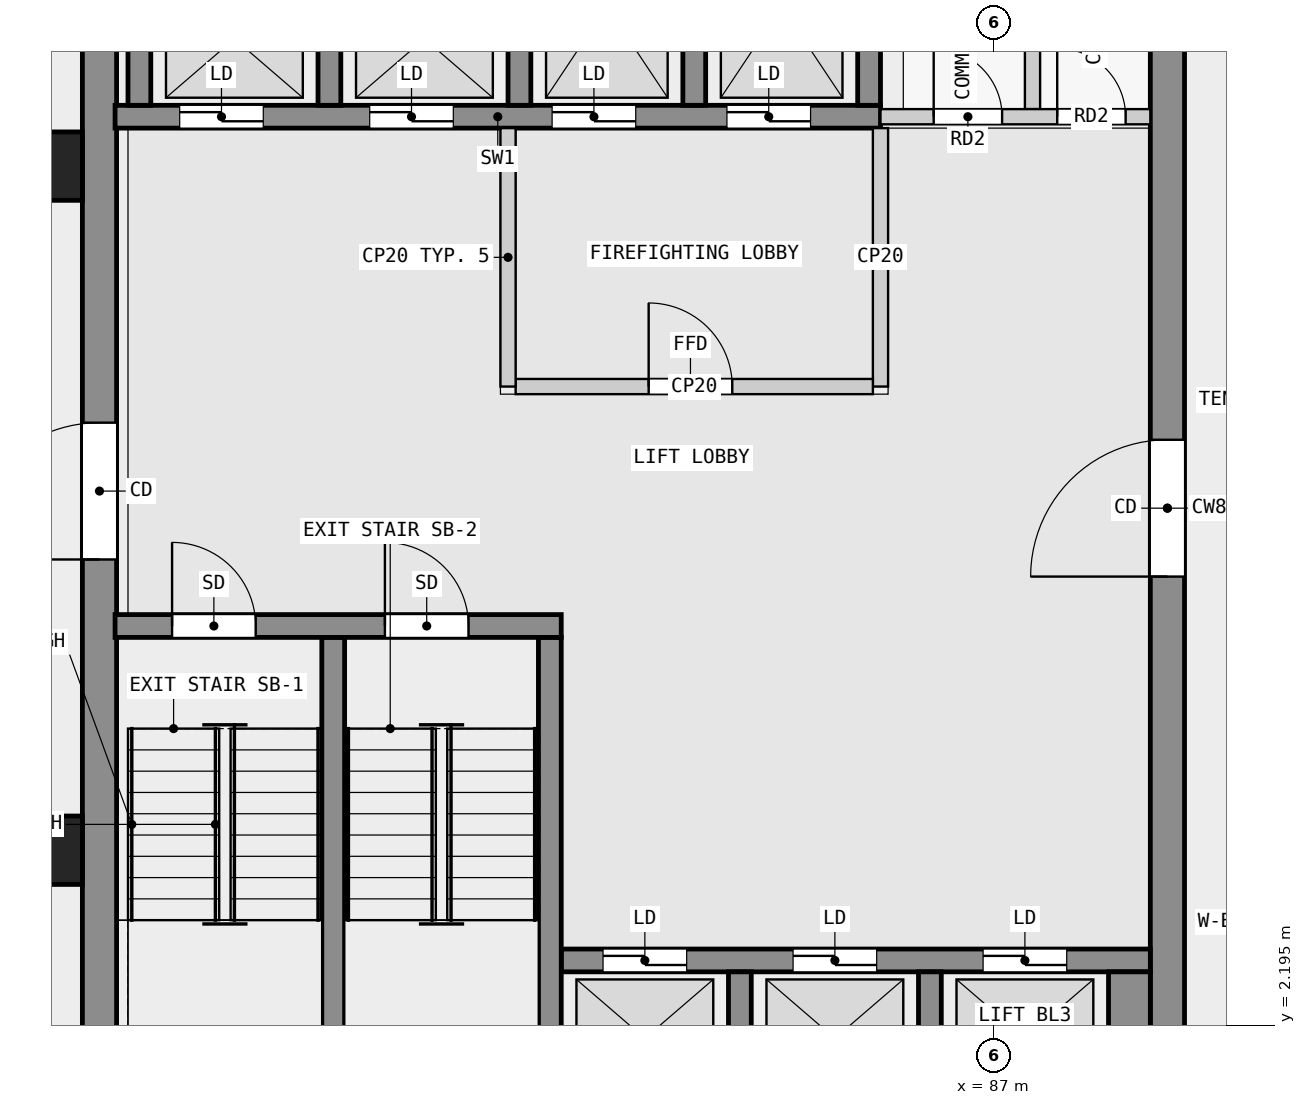
"""IFC4 building model, lengths in metres.
Left out: names, types, materials, properties, quantities, classifications, styles, units other than length and angle.
Written with IfcOpenShell. Run it as: python <this file> out.ifc"""

import sys

from ifc_helpers import new_model, si_unit, direction, frame, frame_2d, origin, origin_2d, place, context, subcontext, project, spatial, rectangle, extrude, element, fill, save


model = new_model("IFC4")
c1 = context("Model", 3, precision=1e-05, world=origin(), true_north=direction((0.0, 1.0)))
c2 = subcontext(c1, "Body", "Model", "MODEL_VIEW")
j1 = project(units=[si_unit("LENGTHUNIT", "METRE"), si_unit("PLANEANGLEUNIT", "RADIAN")], contexts=[c1])
p1 = place(None, origin())
s1 = spatial("IfcSite", under=j1, at=p1, CompositionType="ELEMENT")
p2 = place(p1, origin())
s2 = spatial("IfcBuilding", under=s1, at=p2, CompositionType="ELEMENT")
p3 = place(p2, frame((0.0, 0.0, 65.3)))
s3 = spatial("IfcBuildingStorey", under=s2, at=p3, CompositionType="ELEMENT", Elevation=65.3)
for number, where, z_axis, x_axis in (
    (1, (74.55, 13.5, 0.0), (0.0, 0.0, 1.0), (1.0, 0.0, 0.0)),
    (2, (74.55, 4.5, 0.0), (0.0, 0.0, 1.0), (1.0, 0.0, 0.0)),
):
    element("IfcColumn", number, at=place(p3, frame(where, z_axis=z_axis, x_axis=x_axis)), inside=s3, PredefinedType="COLUMN", context=c2, shape_type="SweptSolid", body=[
        extrude(rectangle(XDim=0.9, YDim=0.9, at=origin_2d()), origin(), (0.0, 0.0, 1.0), 3.5),
    ])
p4 = place(p3, frame((75.225, 0.45, 0.0), z_axis=(0.0, 0.0, 1.0), x_axis=(0.0, 1.0, 0.0)))
e3 = element("IfcWall", 3, at=p4, inside=s3, PredefinedType="SHEAR", context=c2, shape_type="SweptSolid", body=[
    extrude(rectangle(XDim=17.1, YDim=0.45, at=frame_2d((8.55, 0.0))), origin(), (0.0, 0.0, 1.0), 3.25),
])
p5 = place(p4, frame((7.875, 0.0, 0.0)))
e4 = element("IfcOpeningElement", 4, at=p5, cuts=e3, PredefinedType="OPENING", context=c2, shape_type="SweptSolid", body=[
    extrude(rectangle(XDim=1.8, YDim=2.1, at=frame_2d((0.9, 1.05))), frame((0.0, 0.235, 0.0), z_axis=(0.0, -1.0, 0.0), x_axis=(1.0, 0.0, 0.0)), (0.0, 0.0, 1.0), 0.47),
])
p6 = place(p3, frame((89.275, 0.45, 0.0), z_axis=(0.0, 0.0, 1.0), x_axis=(0.0, 1.0, 0.0)))
e5 = element("IfcWall", 5, at=p6, inside=s3, PredefinedType="SHEAR", context=c2, shape_type="SweptSolid", body=[
    extrude(rectangle(XDim=17.1, YDim=0.45, at=frame_2d((8.55, 0.0))), origin(), (0.0, 0.0, 1.0), 3.25),
])
p7 = place(p6, frame((7.65, 0.0, 0.0)))
e6 = element("IfcOpeningElement", 6, at=p7, cuts=e5, PredefinedType="OPENING", context=c2, shape_type="SweptSolid", body=[
    extrude(rectangle(XDim=1.8, YDim=2.1, at=frame_2d((0.9, 1.05))), frame((0.0, 0.235, 0.0), z_axis=(0.0, -1.0, 0.0), x_axis=(1.0, 0.0, 0.0)), (0.0, 0.0, 1.0), 0.47),
])
p8 = place(p3, frame((75.43, 7.45, 0.0), z_axis=(0.0, 0.0, 1.0), x_axis=(1.0, 0.0, 0.0)))
e7 = element("IfcWall", 7, at=p8, inside=s3, PredefinedType="SHEAR", context=c2, shape_type="SweptSolid", body=[
    extrude(rectangle(XDim=5.87, YDim=0.3, at=frame_2d((2.935, 0.0))), origin(), (0.0, 0.0, 1.0), 3.25),
])
p9 = place(p8, frame((0.75, 0.0, 0.0)))
e8 = element("IfcOpeningElement", 8, at=p9, cuts=e7, PredefinedType="OPENING", context=c2, shape_type="SweptSolid", body=[
    extrude(rectangle(XDim=1.1, YDim=2.1, at=frame_2d((0.55, 1.05))), frame((0.0, 0.16, 0.0), z_axis=(0.0, -1.0, 0.0), x_axis=(1.0, 0.0, 0.0)), (0.0, 0.0, 1.0), 0.32),
])
p10 = place(p8, frame((3.55, 0.0, 0.0)))
e9 = element("IfcOpeningElement", 9, at=p10, cuts=e7, PredefinedType="OPENING", context=c2, shape_type="SweptSolid", body=[
    extrude(rectangle(XDim=1.1, YDim=2.1, at=frame_2d((0.55, 1.05))), frame((0.0, 0.16, 0.0), z_axis=(0.0, -1.0, 0.0), x_axis=(1.0, 0.0, 0.0)), (0.0, 0.0, 1.0), 0.32),
])
for number, where, z_axis, x_axis in (
    (10, (78.3, 0.9, 0.0), (0.0, 0.0, 1.0), (0.0, 1.0, 0.0)),
    (11, (81.15, 0.9, 0.0), (0.0, 0.0, 1.0), (0.0, 1.0, 0.0)),
):
    element("IfcWall", number, at=place(p3, frame(where, z_axis=z_axis, x_axis=x_axis)), inside=s3, PredefinedType="SHEAR", context=c2, shape_type="SweptSolid", body=[
        extrude(rectangle(XDim=6.4, YDim=0.3, at=frame_2d((3.2, 0.0))), origin(), (0.0, 0.0, 1.0), 3.25),
    ])
for number, where, z_axis, x_axis in (
    (12, (83.65, 0.9, 0.0), (0.0, 0.0, 1.0), (0.0, 1.0, 0.0)),
    (13, (86.15, 0.9, 0.0), (0.0, 0.0, 1.0), (0.0, 1.0, 0.0)),
):
    element("IfcWall", number, at=place(p3, frame(where, z_axis=z_axis, x_axis=x_axis)), inside=s3, PredefinedType="SHEAR", context=c2, shape_type="SweptSolid", body=[
        extrude(rectangle(XDim=2.0, YDim=0.3, at=frame_2d((1.0, 0.0))), origin(), (0.0, 0.0, 1.0), 3.25),
    ])
p11 = place(p3, frame((88.775, 0.9, 0.0), z_axis=(0.0, 0.0, 1.0), x_axis=(0.0, 1.0, 0.0)))
e14 = element("IfcWall", 14, at=p11, inside=s3, PredefinedType="SHEAR", context=c2, shape_type="SweptSolid", body=[
    extrude(rectangle(XDim=2.0, YDim=0.55, at=frame_2d((1.0, 0.0))), origin(), (0.0, 0.0, 1.0), 3.25),
])
p12 = place(p3, frame((81.3, 3.05, 0.0), z_axis=(0.0, 0.0, 1.0), x_axis=(1.0, 0.0, 0.0)))
e15 = element("IfcWall", 15, at=p12, inside=s3, PredefinedType="SHEAR", context=c2, shape_type="SweptSolid", body=[
    extrude(rectangle(XDim=7.75, YDim=0.3, at=frame_2d((3.875, 0.0))), origin(), (0.0, 0.0, 1.0), 3.25),
])
p13 = place(p12, frame((0.55, 0.0, 0.0)))
e16 = element("IfcOpeningElement", 16, at=p13, cuts=e15, PredefinedType="OPENING", context=c2, shape_type="SweptSolid", body=[
    extrude(rectangle(XDim=1.1, YDim=2.1, at=frame_2d((0.55, 1.05))), frame((0.0, 0.16, 0.0), z_axis=(0.0, -1.0, 0.0), x_axis=(1.0, 0.0, 0.0)), (0.0, 0.0, 1.0), 0.32),
])
p14 = place(p12, frame((3.05, 0.0, 0.0)))
e17 = element("IfcOpeningElement", 17, at=p14, cuts=e15, PredefinedType="OPENING", context=c2, shape_type="SweptSolid", body=[
    extrude(rectangle(XDim=1.1, YDim=2.1, at=frame_2d((0.55, 1.05))), frame((0.0, 0.16, 0.0), z_axis=(0.0, -1.0, 0.0), x_axis=(1.0, 0.0, 0.0)), (0.0, 0.0, 1.0), 0.32),
])
p15 = place(p12, frame((5.55, 0.0, 0.0)))
e18 = element("IfcOpeningElement", 18, at=p15, cuts=e15, PredefinedType="OPENING", context=c2, shape_type="SweptSolid", body=[
    extrude(rectangle(XDim=1.1, YDim=2.1, at=frame_2d((0.55, 1.05))), frame((0.0, 0.16, 0.0), z_axis=(0.0, -1.0, 0.0), x_axis=(1.0, 0.0, 0.0)), (0.0, 0.0, 1.0), 0.32),
])
p16 = place(p3, frame((75.43, 14.15, 0.0), z_axis=(0.0, 0.0, 1.0), x_axis=(1.0, 0.0, 0.0)))
e19 = element("IfcWall", 19, at=p16, inside=s3, PredefinedType="SHEAR", context=c2, shape_type="SweptSolid", body=[
    extrude(rectangle(XDim=10.07, YDim=0.3, at=frame_2d((5.035, 0.0))), origin(), (0.0, 0.0, 1.0), 3.25),
])
p17 = place(p16, frame((0.85, 0.0, 0.0)))
e20 = element("IfcOpeningElement", 20, at=p17, cuts=e19, PredefinedType="OPENING", context=c2, shape_type="SweptSolid", body=[
    extrude(rectangle(XDim=1.1, YDim=2.1, at=frame_2d((0.55, 1.05))), frame((0.0, 0.16, 0.0), z_axis=(0.0, -1.0, 0.0), x_axis=(1.0, 0.0, 0.0)), (0.0, 0.0, 1.0), 0.32),
])
p18 = place(p16, frame((3.35, 0.0, 0.0)))
e21 = element("IfcOpeningElement", 21, at=p18, cuts=e19, PredefinedType="OPENING", context=c2, shape_type="SweptSolid", body=[
    extrude(rectangle(XDim=1.1, YDim=2.1, at=frame_2d((0.55, 1.05))), frame((0.0, 0.16, 0.0), z_axis=(0.0, -1.0, 0.0), x_axis=(1.0, 0.0, 0.0)), (0.0, 0.0, 1.0), 0.32),
])
p19 = place(p16, frame((5.75, 0.0, 0.0)))
e22 = element("IfcOpeningElement", 22, at=p19, cuts=e19, PredefinedType="OPENING", context=c2, shape_type="SweptSolid", body=[
    extrude(rectangle(XDim=1.1, YDim=2.1, at=frame_2d((0.55, 1.05))), frame((0.0, 0.16, 0.0), z_axis=(0.0, -1.0, 0.0), x_axis=(1.0, 0.0, 0.0)), (0.0, 0.0, 1.0), 0.32),
])
p20 = place(p16, frame((8.05, 0.0, 0.0)))
e23 = element("IfcOpeningElement", 23, at=p20, cuts=e19, PredefinedType="OPENING", context=c2, shape_type="SweptSolid", body=[
    extrude(rectangle(XDim=1.1, YDim=2.1, at=frame_2d((0.55, 1.05))), frame((0.0, 0.16, 0.0), z_axis=(0.0, -1.0, 0.0), x_axis=(1.0, 0.0, 0.0)), (0.0, 0.0, 1.0), 0.32),
])
for number, where, z_axis, x_axis in (
    (24, (75.75, 14.3, 0.0), (0.0, 0.0, 1.0), (0.0, 1.0, 0.0)),
    (25, (78.25, 14.3, 0.0), (0.0, 0.0, 1.0), (0.0, 1.0, 0.0)),
    (26, (80.75, 14.3, 0.0), (0.0, 0.0, 1.0), (0.0, 1.0, 0.0)),
    (27, (83.05, 14.3, 0.0), (0.0, 0.0, 1.0), (0.0, 1.0, 0.0)),
    (28, (85.35, 14.3, 0.0), (0.0, 0.0, 1.0), (0.0, 1.0, 0.0)),
):
    element("IfcWall", number, at=place(p3, frame(where, z_axis=z_axis, x_axis=x_axis)), inside=s3, PredefinedType="SHEAR", context=c2, shape_type="SweptSolid", body=[
        extrude(rectangle(XDim=2.8, YDim=0.3, at=frame_2d((1.4, 0.0))), origin(), (0.0, 0.0, 1.0), 3.25),
    ])
p21 = place(p3, frame((80.6, 10.6, 0.0), z_axis=(0.0, 0.0, 1.0), x_axis=(0.0, 1.0, 0.0)))
e29 = element("IfcWall", 29, at=p21, inside=s3, PredefinedType="PARTITIONING", context=c2, shape_type="SweptSolid", body=[
    extrude(rectangle(XDim=3.4, YDim=0.2, at=frame_2d((1.7, 0.0))), origin(), (0.0, 0.0, 1.0), 3.25),
])
p22 = place(p3, frame((80.7, 10.6, 0.0), z_axis=(0.0, 0.0, 1.0), x_axis=(1.0, 0.0, 0.0)))
e30 = element("IfcWall", 30, at=p22, inside=s3, PredefinedType="PARTITIONING", context=c2, shape_type="SweptSolid", body=[
    extrude(rectangle(XDim=4.7, YDim=0.2, at=frame_2d((2.35, 0.0))), origin(), (0.0, 0.0, 1.0), 3.25),
])
p23 = place(p22, frame((1.75, 0.0, 0.0)))
e31 = element("IfcOpeningElement", 31, at=p23, cuts=e30, PredefinedType="OPENING", context=c2, shape_type="SweptSolid", body=[
    extrude(rectangle(XDim=1.1, YDim=2.1, at=frame_2d((0.55, 1.05))), frame((0.0, 0.11, 0.0), z_axis=(0.0, -1.0, 0.0), x_axis=(1.0, 0.0, 0.0)), (0.0, 0.0, 1.0), 0.22),
])
p24 = place(p3, frame((85.5, 10.6, 0.0), z_axis=(0.0, 0.0, 1.0), x_axis=(0.0, 1.0, 0.0)))
e32 = element("IfcWall", 32, at=p24, inside=s3, PredefinedType="PARTITIONING", context=c2, shape_type="SweptSolid", body=[
    extrude(rectangle(XDim=3.4, YDim=0.2, at=frame_2d((1.7, 0.0))), origin(), (0.0, 0.0, 1.0), 3.25),
])
p25 = place(p3, frame((85.5, 14.15, 0.0), z_axis=(0.0, 0.0, 1.0), x_axis=(1.0, 0.0, 0.0)))
e33 = element("IfcWall", 33, at=p25, inside=s3, PredefinedType="PARTITIONING", context=c2, shape_type="SweptSolid", body=[
    extrude(rectangle(XDim=3.55, YDim=0.2, at=frame_2d((1.775, 0.0))), origin(), (0.0, 0.0, 1.0), 3.25),
])
p26 = place(p25, frame((0.7, 0.0, 0.0)))
e34 = element("IfcOpeningElement", 34, at=p26, cuts=e33, PredefinedType="OPENING", context=c2, shape_type="SweptSolid", body=[
    extrude(rectangle(XDim=0.9, YDim=2.1, at=frame_2d((0.45, 1.05))), frame((0.0, 0.11, 0.0), z_axis=(0.0, -1.0, 0.0), x_axis=(1.0, 0.0, 0.0)), (0.0, 0.0, 1.0), 0.22),
])
p27 = place(p25, frame((2.325, 0.0, 0.0)))
e35 = element("IfcOpeningElement", 35, at=p27, cuts=e33, PredefinedType="OPENING", context=c2, shape_type="SweptSolid", body=[
    extrude(rectangle(XDim=0.9, YDim=2.1, at=frame_2d((0.45, 1.05))), frame((0.0, 0.11, 0.0), z_axis=(0.0, -1.0, 0.0), x_axis=(1.0, 0.0, 0.0)), (0.0, 0.0, 1.0), 0.22),
])
p28 = place(p3, frame((87.5, 14.25, 0.0), z_axis=(0.0, 0.0, 1.0), x_axis=(0.0, 1.0, 0.0)))
e36 = element("IfcWall", 36, at=p28, inside=s3, PredefinedType="PARTITIONING", context=c2, shape_type="SweptSolid", body=[
    extrude(rectangle(XDim=3.3, YDim=0.2, at=frame_2d((1.65, 0.0))), origin(), (0.0, 0.0, 1.0), 3.25),
])
p29 = place(p23, origin())
e37 = element("IfcDoor", 37, at=p29, inside=s3, OperationType="SINGLE_SWING_LEFT", PredefinedType="DOOR", context=c2, shape_type="SweptSolid", body=[
    extrude(rectangle(XDim=1.1, YDim=2.1, at=frame_2d((0.55, 1.05))), frame((0.0, 0.025, 0.0), z_axis=(0.0, -1.0, 0.0), x_axis=(1.0, 0.0, 0.0)), (0.0, 0.0, 1.0), 0.05),
])
fill(e31, e37)
p30 = place(p13, origin())
e38 = element("IfcDoor", 38, at=p30, inside=s3, OperationType="DOUBLE_DOOR_SLIDING", PredefinedType="DOOR", context=c2, shape_type="SweptSolid", body=[
    extrude(rectangle(XDim=1.1, YDim=2.1, at=frame_2d((0.55, 1.05))), frame((0.0, 0.025, 0.0), z_axis=(0.0, -1.0, 0.0), x_axis=(1.0, 0.0, 0.0)), (0.0, 0.0, 1.0), 0.05),
])
fill(e16, e38)
p31 = place(p14, origin())
e39 = element("IfcDoor", 39, at=p31, inside=s3, OperationType="DOUBLE_DOOR_SLIDING", PredefinedType="DOOR", context=c2, shape_type="SweptSolid", body=[
    extrude(rectangle(XDim=1.1, YDim=2.1, at=frame_2d((0.55, 1.05))), frame((0.0, 0.025, 0.0), z_axis=(0.0, -1.0, 0.0), x_axis=(1.0, 0.0, 0.0)), (0.0, 0.0, 1.0), 0.05),
])
fill(e17, e39)
p32 = place(p15, origin())
e40 = element("IfcDoor", 40, at=p32, inside=s3, OperationType="DOUBLE_DOOR_SLIDING", PredefinedType="DOOR", context=c2, shape_type="SweptSolid", body=[
    extrude(rectangle(XDim=1.1, YDim=2.1, at=frame_2d((0.55, 1.05))), frame((0.0, 0.025, 0.0), z_axis=(0.0, -1.0, 0.0), x_axis=(1.0, 0.0, 0.0)), (0.0, 0.0, 1.0), 0.05),
])
fill(e18, e40)
p33 = place(p17, origin())
e41 = element("IfcDoor", 41, at=p33, inside=s3, OperationType="DOUBLE_DOOR_SLIDING", PredefinedType="DOOR", context=c2, shape_type="SweptSolid", body=[
    extrude(rectangle(XDim=1.1, YDim=2.1, at=frame_2d((0.55, 1.05))), frame((0.0, 0.025, 0.0), z_axis=(0.0, -1.0, 0.0), x_axis=(1.0, 0.0, 0.0)), (0.0, 0.0, 1.0), 0.05),
])
fill(e20, e41)
p34 = place(p18, origin())
e42 = element("IfcDoor", 42, at=p34, inside=s3, OperationType="DOUBLE_DOOR_SLIDING", PredefinedType="DOOR", context=c2, shape_type="SweptSolid", body=[
    extrude(rectangle(XDim=1.1, YDim=2.1, at=frame_2d((0.55, 1.05))), frame((0.0, 0.025, 0.0), z_axis=(0.0, -1.0, 0.0), x_axis=(1.0, 0.0, 0.0)), (0.0, 0.0, 1.0), 0.05),
])
fill(e21, e42)
p35 = place(p19, origin())
e43 = element("IfcDoor", 43, at=p35, inside=s3, OperationType="DOUBLE_DOOR_SLIDING", PredefinedType="DOOR", context=c2, shape_type="SweptSolid", body=[
    extrude(rectangle(XDim=1.1, YDim=2.1, at=frame_2d((0.55, 1.05))), frame((0.0, 0.025, 0.0), z_axis=(0.0, -1.0, 0.0), x_axis=(1.0, 0.0, 0.0)), (0.0, 0.0, 1.0), 0.05),
])
fill(e22, e43)
p36 = place(p20, origin())
e44 = element("IfcDoor", 44, at=p36, inside=s3, OperationType="DOUBLE_DOOR_SLIDING", PredefinedType="DOOR", context=c2, shape_type="SweptSolid", body=[
    extrude(rectangle(XDim=1.1, YDim=2.1, at=frame_2d((0.55, 1.05))), frame((0.0, 0.025, 0.0), z_axis=(0.0, -1.0, 0.0), x_axis=(1.0, 0.0, 0.0)), (0.0, 0.0, 1.0), 0.05),
])
fill(e23, e44)
p37 = place(p9, origin())
e45 = element("IfcDoor", 45, at=p37, inside=s3, OperationType="SINGLE_SWING_RIGHT", PredefinedType="DOOR", context=c2, shape_type="SweptSolid", body=[
    extrude(rectangle(XDim=1.1, YDim=2.1, at=frame_2d((0.55, 1.05))), frame((0.0, 0.025, 0.0), z_axis=(0.0, -1.0, 0.0), x_axis=(1.0, 0.0, 0.0)), (0.0, 0.0, 1.0), 0.05),
])
fill(e8, e45)
p38 = place(p10, origin())
e46 = element("IfcDoor", 46, at=p38, inside=s3, OperationType="SINGLE_SWING_LEFT", PredefinedType="DOOR", context=c2, shape_type="SweptSolid", body=[
    extrude(rectangle(XDim=1.1, YDim=2.1, at=frame_2d((0.55, 1.05))), frame((0.0, 0.025, 0.0), z_axis=(0.0, -1.0, 0.0), x_axis=(1.0, 0.0, 0.0)), (0.0, 0.0, 1.0), 0.05),
])
fill(e9, e46)
p39 = place(p5, origin())
e47 = element("IfcDoor", 47, at=p39, inside=s3, OperationType="DOUBLE_DOOR_SINGLE_SWING", PredefinedType="DOOR", context=c2, shape_type="SweptSolid", body=[
    extrude(rectangle(XDim=1.8, YDim=2.1, at=frame_2d((0.9, 1.05))), frame((0.0, 0.025, 0.0), z_axis=(0.0, -1.0, 0.0), x_axis=(1.0, 0.0, 0.0)), (0.0, 0.0, 1.0), 0.05),
])
fill(e4, e47)
p40 = place(p7, origin())
e48 = element("IfcDoor", 48, at=p40, inside=s3, OperationType="DOUBLE_DOOR_SINGLE_SWING", PredefinedType="DOOR", context=c2, shape_type="SweptSolid", body=[
    extrude(rectangle(XDim=1.8, YDim=2.1, at=frame_2d((0.9, 1.05))), frame((0.0, 0.025, 0.0), z_axis=(0.0, -1.0, 0.0), x_axis=(1.0, 0.0, 0.0)), (0.0, 0.0, 1.0), 0.05),
])
fill(e6, e48)
p41 = place(p26, origin())
e49 = element("IfcDoor", 49, at=p41, inside=s3, OperationType="SINGLE_SWING_LEFT", PredefinedType="DOOR", context=c2, shape_type="SweptSolid", body=[
    extrude(rectangle(XDim=0.9, YDim=2.1, at=frame_2d((0.45, 1.05))), frame((0.0, 0.025, 0.0), z_axis=(0.0, -1.0, 0.0), x_axis=(1.0, 0.0, 0.0)), (0.0, 0.0, 1.0), 0.05),
])
fill(e34, e49)
p42 = place(p27, origin())
e50 = element("IfcDoor", 50, at=p42, inside=s3, OperationType="SINGLE_SWING_LEFT", PredefinedType="DOOR", context=c2, shape_type="SweptSolid", body=[
    extrude(rectangle(XDim=0.9, YDim=2.1, at=frame_2d((0.45, 1.05))), frame((0.0, 0.025, 0.0), z_axis=(0.0, -1.0, 0.0), x_axis=(1.0, 0.0, 0.0)), (0.0, 0.0, 1.0), 0.05),
])
fill(e35, e50)
save(model, sys.argv[1])
